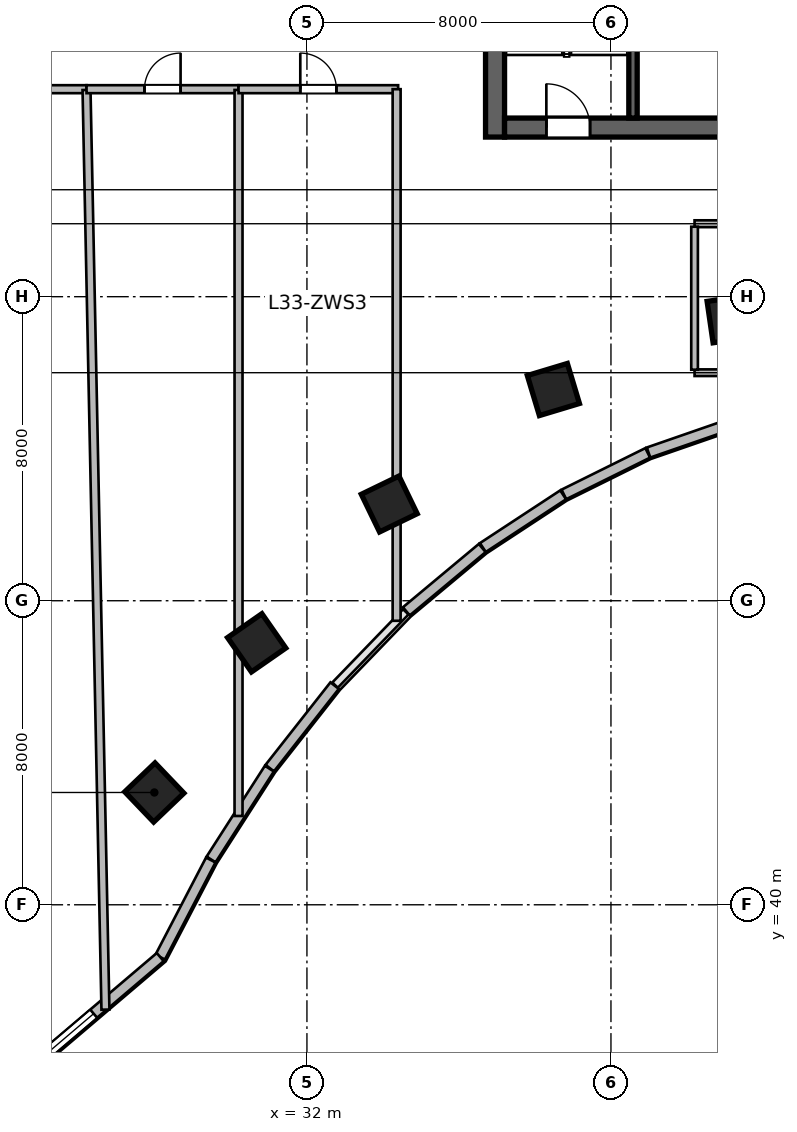
"""IFC4 building model, lengths in metres.
Left out: names, types, materials, properties, quantities, classifications, styles, units other than length and angle.
Written with IfcOpenShell. Run it as: python <this file> out.ifc"""

import sys

from ifc_helpers import new_model, si_unit, direction, frame, frame_2d, origin, origin_2d, place, context, subcontext, project, spatial, rectangle, extrude, source, transform, mapped, element, fill, save


model = new_model("IFC4")
c1 = context("Model", 3, precision=1e-05, world=origin(), true_north=direction((0.0, 1.0)))
c2 = subcontext(c1, "Body", "Model", "MODEL_VIEW")
j1 = project(units=[si_unit("LENGTHUNIT", "METRE"), si_unit("PLANEANGLEUNIT", "RADIAN")], contexts=[c1])
p1 = place(None, origin())
s1 = spatial("IfcSite", under=j1, at=p1, CompositionType="ELEMENT")
p2 = place(p1, origin())
s2 = spatial("IfcBuilding", under=s1, at=p2, CompositionType="ELEMENT")
p3 = place(p2, frame((0.0, 0.0, 138.9)))
s3 = spatial("IfcBuildingStorey", under=s2, at=p3, CompositionType="ELEMENT", Elevation=138.9)
m1 = source(origin(), c2, "Body", "SweptSolid", [
    extrude(rectangle(XDim=12.0, YDim=0.5, at=frame_2d((6.0, 0.0))), origin(), (0.0, 0.0, 1.0), 3.9),
])
p4 = place(p3, frame((36.95, 60.2, 0.0), z_axis=(0.0, 0.0, 1.0), x_axis=(0.0, 1.0, 0.0)))
e1 = element("IfcWall", 1, at=p4, inside=s3, PredefinedType="SHEAR", context=c2, shape_type="MappedRepresentation", body=[
    mapped(m1, transform((0.0, 0.0, 0.0), scale=1.0)),
])
m2 = source(origin(), c2, "Body", "SweptSolid", [
    extrude(rectangle(XDim=21.6, YDim=0.5, at=frame_2d((10.8, 0.0))), origin(), (0.0, 0.0, 1.0), 3.9),
])
p5 = place(p3, frame((37.2, 60.45, 0.0), z_axis=(0.0, 0.0, 1.0), x_axis=(1.0, 0.0, 0.0)))
e2 = element("IfcWall", 2, at=p5, inside=s3, PredefinedType="SHEAR", context=c2, shape_type="MappedRepresentation", body=[
    mapped(m2, transform((0.0, 0.0, 0.0), scale=1.0)),
])
p6 = place(p5, frame((1.1, 0.0, 0.0)))
e3 = element("IfcOpeningElement", 3, at=p6, cuts=e2, PredefinedType="OPENING", context=c2, shape_type="SweptSolid", body=[
    extrude(rectangle(XDim=1.15, YDim=2.15, at=frame_2d((0.575, 1.075))), frame((0.0, 0.26, 0.0), z_axis=(0.0, -1.0, 0.0), x_axis=(1.0, 0.0, 0.0)), (0.0, 0.0, 1.0), 0.52),
])
p7 = place(p5, frame((19.5, 0.0, 0.0)))
e4 = element("IfcOpeningElement", 4, at=p7, cuts=e2, PredefinedType="OPENING", context=c2, shape_type="SweptSolid", body=[
    extrude(rectangle(XDim=0.9, YDim=2.1, at=frame_2d((0.45, 1.05))), frame((0.0, 0.26, 0.0), z_axis=(0.0, -1.0, 0.0), x_axis=(1.0, 0.0, 0.0)), (0.0, 0.0, 1.0), 0.52),
])
p8 = place(p5, frame((12.02, 0.0, 0.0)))
e5 = element("IfcOpeningElement", 5, at=p8, cuts=e2, PredefinedType="OPENING", context=c2, shape_type="SweptSolid", body=[
    extrude(rectangle(XDim=1.6, YDim=2.15, at=frame_2d((0.8, 1.075))), frame((0.0, 0.26, 0.0), z_axis=(0.0, -1.0, 0.0), x_axis=(1.0, 0.0, 0.0)), (0.0, 0.0, 1.0), 0.52),
])
m3 = source(origin(), c2, "Body", "SweptSolid", [
    extrude(rectangle(XDim=11.0, YDim=0.22, at=frame_2d((5.5, 0.0))), origin(), (0.0, 0.0, 1.0), 3.9),
])
p9 = place(p3, frame((40.58, 60.7, 0.0), z_axis=(0.0, 0.0, 1.0), x_axis=(0.0, 1.0, 0.0)))
e6 = element("IfcWall", 6, at=p9, inside=s3, PredefinedType="SHEAR", context=c2, shape_type="MappedRepresentation", body=[
    mapped(m3, transform((0.0, 0.0, 0.0), scale=1.0)),
])
m4 = source(origin(), c2, "Body", "SweptSolid", [
    extrude(rectangle(XDim=1.1, YDim=1.1, at=origin_2d()), origin(), (0.0, 0.0, 1.0), 3.9),
])
for number, where, z_axis, x_axis in (
    (7, (27.985, 42.955, 0.0), (0.0, 0.0, 1.0), (-0.691, 0.723, 0.0)),
    (8, (30.677, 46.892, 0.0), (0.0, 0.0, 1.0), (-0.571, 0.821, 0.0)),
    (9, (34.166, 50.545, 0.0), (0.0, 0.0, 1.0), (-0.436, 0.9, 0.0)),
    (10, (38.485, 53.558, 0.0), (0.0, 0.0, 1.0), (-0.289, 0.957, 0.0)),
    (11, (43.154, 55.411, 0.0), (0.0, 0.0, 1.0), (-0.143, 0.99, 0.0)),
):
    element("IfcColumn", number, at=place(p3, frame(where, z_axis=z_axis, x_axis=x_axis)), inside=s3, PredefinedType="COLUMN", context=c2, shape_type="MappedRepresentation", body=[
        mapped(m4, transform((0.0, 0.0, 0.0), scale=1.0)),
    ])
m5 = source(origin(), c2, "Body", "SweptSolid", [
    extrude(rectangle(XDim=2.411, YDim=0.28, at=frame_2d((1.205, 0.0))), origin(), (0.0, 0.0, 1.0), 3.65),
])
p10 = place(p3, frame((43.266, 52.689, 0.0), z_axis=(0.0, 0.0, 1.0), x_axis=(-0.944880068161, -0.327416640982, 0.0)))
e12 = element("IfcWall", 12, at=p10, inside=s3, PredefinedType="SOLIDWALL", context=c2, shape_type="MappedRepresentation", body=[
    mapped(m5, transform((0.0, 0.0, 0.0), scale=1.0)),
])
m6 = source(origin(), c2, "Body", "SweptSolid", [
    extrude(rectangle(XDim=2.462, YDim=0.28, at=frame_2d((1.231, 0.0))), origin(), (0.0, 0.0, 1.0), 3.65),
])
p11 = place(p3, frame((40.967, 51.891, 0.0), z_axis=(0.0, 0.0, 1.0), x_axis=(-0.8959882207, -0.444077817917, 0.0)))
e13 = element("IfcWall", 13, at=p11, inside=s3, PredefinedType="SOLIDWALL", context=c2, shape_type="MappedRepresentation", body=[
    mapped(m6, transform((0.0, 0.0, 0.0), scale=1.0)),
])
m7 = source(origin(), c2, "Body", "SweptSolid", [
    extrude(rectangle(XDim=2.527, YDim=0.28, at=frame_2d((1.264, 0.0))), origin(), (0.0, 0.0, 1.0), 3.65),
])
p12 = place(p3, frame((38.742, 50.786, 0.0), z_axis=(0.0, 0.0, 1.0), x_axis=(-0.836011905051, -0.548711303523, 0.0)))
e14 = element("IfcWall", 14, at=p12, inside=s3, PredefinedType="SOLIDWALL", context=c2, shape_type="MappedRepresentation", body=[
    mapped(m7, transform((0.0, 0.0, 0.0), scale=1.0)),
])
m8 = source(origin(), c2, "Body", "SweptSolid", [
    extrude(rectangle(XDim=2.601, YDim=0.28, at=frame_2d((1.3, 0.0))), origin(), (0.0, 0.0, 1.0), 3.65),
])
p13 = place(p3, frame((36.613, 49.387, 0.0), z_axis=(0.0, 0.0, 1.0), x_axis=(-0.76796730295, -0.640489048775, 0.0)))
e15 = element("IfcWall", 15, at=p13, inside=s3, PredefinedType="SOLIDWALL", context=c2, shape_type="MappedRepresentation", body=[
    mapped(m8, transform((0.0, 0.0, 0.0), scale=1.0)),
])
m9 = source(origin(), c2, "Body", "SweptSolid", [
    extrude(rectangle(XDim=2.76, YDim=0.28, at=frame_2d((1.38, 0.0))), origin(), (0.0, 0.0, 1.0), 3.65),
])
p14 = place(p3, frame((32.728, 45.766, 0.0), z_axis=(0.0, 0.0, 1.0), x_axis=(-0.618180818641, -0.786035925047, 0.0)))
e16 = element("IfcWall", 16, at=p14, inside=s3, PredefinedType="SOLIDWALL", context=c2, shape_type="MappedRepresentation", body=[
    mapped(m9, transform((0.0, 0.0, 0.0), scale=1.0)),
])
m10 = source(origin(), c2, "Body", "SweptSolid", [
    extrude(rectangle(XDim=2.84, YDim=0.28, at=frame_2d((1.42, 0.0))), origin(), (0.0, 0.0, 1.0), 3.65),
])
p15 = place(p3, frame((31.011, 43.582, 0.0), z_axis=(0.0, 0.0, 1.0), x_axis=(-0.540214368057, -0.841527442538, 0.0)))
e17 = element("IfcWall", 17, at=p15, inside=s3, PredefinedType="SOLIDWALL", context=c2, shape_type="MappedRepresentation", body=[
    mapped(m10, transform((0.0, 0.0, 0.0), scale=1.0)),
])
m11 = source(origin(), c2, "Body", "SweptSolid", [
    extrude(rectangle(XDim=2.88, YDim=0.28, at=frame_2d((1.44, 0.0))), origin(), (0.0, 0.0, 1.0), 3.65),
])
p16 = place(p3, frame((29.469, 41.178, 0.0), z_axis=(0.0, 0.0, 1.0), x_axis=(-0.461769086658, -0.887000175088, 0.0)))
e18 = element("IfcWall", 18, at=p16, inside=s3, PredefinedType="SOLIDWALL", context=c2, shape_type="MappedRepresentation", body=[
    mapped(m11, transform((0.0, 0.0, 0.0), scale=1.0)),
])
m12 = source(origin(), c2, "Body", "SweptSolid", [
    extrude(rectangle(XDim=4.659, YDim=0.28, at=frame_2d((2.33, 0.0))), origin(), (0.0, 0.0, 1.0), 3.65),
])
p17 = place(p3, frame((28.139, 38.624, 0.0), z_axis=(0.0, 0.0, 1.0), x_axis=(-0.761913458795, -0.647678841176, 0.0)))
e19 = element("IfcWall", 19, at=p17, inside=s3, PredefinedType="SOLIDWALL", context=c2, shape_type="MappedRepresentation", body=[
    mapped(m12, transform((0.0, 0.0, 0.0), scale=1.0)),
])
p18 = place(p17, frame((2.299, 0.0, 0.95)))
e20 = element("IfcOpeningElement", 20, at=p18, cuts=e19, PredefinedType="OPENING", context=c2, shape_type="SweptSolid", body=[
    extrude(rectangle(XDim=2.2, YDim=2.1, at=frame_2d((1.1, 1.05))), frame((0.0, 0.15, 0.0), z_axis=(0.0, -1.0, 0.0), x_axis=(1.0, 0.0, 0.0)), (0.0, 0.0, 1.0), 0.3),
])
m13 = source(origin(), c2, "Body", "SweptSolid", [
    extrude(rectangle(XDim=4.176, YDim=0.175, at=frame_2d((2.088, 0.0))), origin(), (0.0, 0.0, 1.0), 3.65),
])
p19 = place(p3, frame((42.2, 54.0, 0.0), z_axis=(0.0, 0.0, 1.0), x_axis=(1.0, 0.0, 0.0)))
e21 = element("IfcWall", 21, at=p19, inside=s3, PredefinedType="PARTITIONING", context=c2, shape_type="MappedRepresentation", body=[
    mapped(m13, transform((0.0, 0.0, 0.0), scale=1.0)),
])
m14 = source(origin(), c2, "Body", "SweptSolid", [
    extrude(rectangle(XDim=4.176, YDim=0.18, at=frame_2d((2.088, 0.0))), origin(), (0.0, 0.0, 1.0), 3.65),
])
p20 = place(p3, frame((42.2, 57.92, 0.0), z_axis=(0.0, 0.0, 1.0), x_axis=(1.0, 0.0, 0.0)))
e22 = element("IfcWall", 22, at=p20, inside=s3, PredefinedType="PLUMBINGWALL", context=c2, shape_type="MappedRepresentation", body=[
    mapped(m14, transform((0.0, 0.0, 0.0), scale=1.0)),
])
p21 = place(p20, frame((1.638, 0.0, 0.0)))
e23 = element("IfcOpeningElement", 23, at=p21, cuts=e22, PredefinedType="OPENING", context=c2, shape_type="SweptSolid", body=[
    extrude(rectangle(XDim=0.9, YDim=2.08, at=frame_2d((0.45, 1.04))), frame((0.0, 0.1, 0.0), z_axis=(0.0, -1.0, 0.0), x_axis=(1.0, 0.0, 0.0)), (0.0, 0.0, 1.0), 0.2),
])
m15 = source(origin(), c2, "Body", "SweptSolid", [
    extrude(rectangle(XDim=3.763, YDim=0.175, at=frame_2d((1.881, 0.0))), origin(), (0.0, 0.0, 1.0), 3.65),
])
p22 = place(p3, frame((42.2, 54.079, 0.0), z_axis=(0.0, 0.0, 1.0), x_axis=(0.0, 1.0, 0.0)))
e24 = element("IfcWall", 24, at=p22, inside=s3, PredefinedType="PARTITIONING", context=c2, shape_type="MappedRepresentation", body=[
    mapped(m15, transform((0.0, 0.0, 0.0), scale=1.0)),
])
m16 = source(origin(), c2, "Body", "SweptSolid", [
    extrude(rectangle(XDim=3.02, YDim=0.21, at=frame_2d((1.51, 0.0))), origin(), (0.0, 0.0, 1.0), 3.65),
])
p23 = place(p3, frame((23.18, 61.46, 0.0), z_axis=(0.0, 0.0, 1.0), x_axis=(1.0, 0.0, 0.0)))
e25 = element("IfcWall", 25, at=p23, inside=s3, PredefinedType="PARTITIONING", context=c2, shape_type="MappedRepresentation", body=[
    mapped(m16, transform((0.0, 0.0, 0.0), scale=1.0)),
])
p24 = place(p23, frame((1.035, 0.0, 0.0)))
e26 = element("IfcOpeningElement", 26, at=p24, cuts=e25, PredefinedType="OPENING", context=c2, shape_type="SweptSolid", body=[
    extrude(rectangle(XDim=0.95, YDim=2.1, at=frame_2d((0.475, 1.05))), frame((0.0, 0.115, 0.0), z_axis=(0.0, -1.0, 0.0), x_axis=(1.0, 0.0, 0.0)), (0.0, 0.0, 1.0), 0.23),
])
m17 = source(origin(), c2, "Body", "SweptSolid", [
    extrude(rectangle(XDim=24.204, YDim=0.21, at=frame_2d((12.102, 0.0))), origin(), (0.0, 0.0, 1.0), 2.942),
])
p25 = place(p3, frame((26.698, 37.241, 0.0), z_axis=(0.0, 0.0, 1.0), x_axis=(-0.020566881318, 0.999788479326, 0.0)))
e27 = element("IfcWall", 27, at=p25, inside=s3, PredefinedType="PARTITIONING", context=c2, shape_type="MappedRepresentation", body=[
    mapped(m17, transform((0.0, 0.0, 0.0), scale=1.0)),
])
m18 = source(origin(), c2, "Body", "SweptSolid", [
    extrude(rectangle(XDim=4.0, YDim=0.21, at=frame_2d((2.0, 0.0))), origin(), (0.0, 0.0, 1.0), 3.65),
])
p26 = place(p3, frame((26.2, 61.46, 0.0), z_axis=(0.0, 0.0, 1.0), x_axis=(1.0, 0.0, 0.0)))
e28 = element("IfcWall", 28, at=p26, inside=s3, PredefinedType="PARTITIONING", context=c2, shape_type="MappedRepresentation", body=[
    mapped(m18, transform((0.0, 0.0, 0.0), scale=1.0)),
])
p27 = place(p26, frame((1.525, 0.0, 0.0)))
e29 = element("IfcOpeningElement", 29, at=p27, cuts=e28, PredefinedType="OPENING", context=c2, shape_type="SweptSolid", body=[
    extrude(rectangle(XDim=0.95, YDim=2.1, at=frame_2d((0.475, 1.05))), frame((0.0, 0.115, 0.0), z_axis=(0.0, -1.0, 0.0), x_axis=(1.0, 0.0, 0.0)), (0.0, 0.0, 1.0), 0.23),
])
m19 = source(origin(), c2, "Body", "SweptSolid", [
    extrude(rectangle(XDim=19.103, YDim=0.21, at=frame_2d((9.552, 0.0))), origin(), (0.0, 0.0, 1.0), 2.942),
])
p28 = place(p3, frame((30.2, 42.337, 0.0), z_axis=(0.0, 0.0, 1.0), x_axis=(0.0, 1.0, 0.0)))
e30 = element("IfcWall", 30, at=p28, inside=s3, PredefinedType="PARTITIONING", context=c2, shape_type="MappedRepresentation", body=[
    mapped(m19, transform((0.0, 0.0, 0.0), scale=1.0)),
])
m20 = source(origin(), c2, "Body", "SweptSolid", [
    extrude(rectangle(XDim=4.2, YDim=0.21, at=frame_2d((2.1, 0.0))), origin(), (0.0, 0.0, 1.0), 3.65),
])
p29 = place(p3, frame((30.2, 61.46, 0.0), z_axis=(0.0, 0.0, 1.0), x_axis=(1.0, 0.0, 0.0)))
e31 = element("IfcWall", 31, at=p29, inside=s3, PredefinedType="PARTITIONING", context=c2, shape_type="MappedRepresentation", body=[
    mapped(m20, transform((0.0, 0.0, 0.0), scale=1.0)),
])
p30 = place(p29, frame((1.625, 0.0, 0.0)))
e32 = element("IfcOpeningElement", 32, at=p30, cuts=e31, PredefinedType="OPENING", context=c2, shape_type="SweptSolid", body=[
    extrude(rectangle(XDim=0.95, YDim=2.1, at=frame_2d((0.475, 1.05))), frame((0.0, 0.115, 0.0), z_axis=(0.0, -1.0, 0.0), x_axis=(1.0, 0.0, 0.0)), (0.0, 0.0, 1.0), 0.23),
])
m21 = source(origin(), c2, "Body", "SweptSolid", [
    extrude(rectangle(XDim=13.988, YDim=0.21, at=frame_2d((6.994, 0.0))), origin(), (0.0, 0.0, 1.0), 3.65),
])
p31 = place(p3, frame((34.36, 47.472, 0.0), z_axis=(0.0, 0.0, 1.0), x_axis=(0.0, 1.0, 0.0)))
e33 = element("IfcWall", 33, at=p31, inside=s3, PredefinedType="PARTITIONING", context=c2, shape_type="MappedRepresentation", body=[
    mapped(m21, transform((0.0, 0.0, 0.0), scale=1.0)),
])
m22 = source(origin(), c2, "Body", "SweptSolid", [
    extrude(rectangle(XDim=2.2, YDim=2.1, at=frame_2d((1.1, 1.05))), frame((0.0, 0.03, 0.0), z_axis=(0.0, -1.0, 0.0), x_axis=(1.0, 0.0, 0.0)), (0.0, 0.0, 1.0), 0.06),
])
p32 = place(p18, origin())
e34 = element("IfcWindow", 34, at=p32, inside=s3, PartitioningType="TRIPLE_PANEL_VERTICAL", PredefinedType="WINDOW", context=c2, shape_type="MappedRepresentation", body=[
    mapped(m22, transform((0.0, 0.0, 0.0), scale=1.0)),
])
fill(e20, e34)
m23 = source(origin(), c2, "Body", "SweptSolid", [
    extrude(rectangle(XDim=1.15, YDim=2.15, at=frame_2d((0.575, 1.075))), frame((0.0, 0.025, 0.0), z_axis=(0.0, -1.0, 0.0), x_axis=(1.0, 0.0, 0.0)), (0.0, 0.0, 1.0), 0.05),
])
p33 = place(p6, origin())
e35 = element("IfcDoor", 35, at=p33, inside=s3, OperationType="SINGLE_SWING_LEFT", PredefinedType="DOOR", context=c2, shape_type="MappedRepresentation", body=[
    mapped(m23, transform((0.0, 0.0, 0.0), scale=1.0)),
])
fill(e3, e35)
m24 = source(origin(), c2, "Body", "SweptSolid", [
    extrude(rectangle(XDim=0.95, YDim=2.1, at=frame_2d((0.475, 1.05))), frame((0.0, 0.025, 0.0), z_axis=(0.0, -1.0, 0.0), x_axis=(1.0, 0.0, 0.0)), (0.0, 0.0, 1.0), 0.05),
])
p34 = place(p27, origin())
e36 = element("IfcDoor", 36, at=p34, inside=s3, OperationType="SINGLE_SWING_RIGHT", PredefinedType="DOOR", context=c2, shape_type="MappedRepresentation", body=[
    mapped(m24, transform((0.0, 0.0, 0.0), scale=1.0)),
])
fill(e29, e36)
p35 = place(p30, origin())
e37 = element("IfcDoor", 37, at=p35, inside=s3, OperationType="SINGLE_SWING_LEFT", PredefinedType="DOOR", context=c2, shape_type="MappedRepresentation", body=[
    mapped(m24, transform((0.0, 0.0, 0.0), scale=1.0)),
])
fill(e32, e37)
save(model, sys.argv[1])
